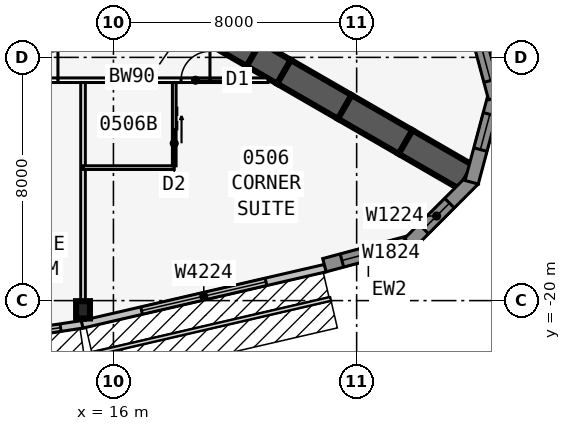
"""IFC4 building model, lengths in metres.
Left out: names, types, materials, properties, quantities, classifications, styles, units other than length and angle.
Written with IfcOpenShell. Run it as: python <this file> out.ifc"""

import sys

from ifc_helpers import new_model, si_unit, direction, frame, frame_2d, origin, origin_2d, place, context, subcontext, project, spatial, polyline, rectangle, i_section, outline, extrude, element, fill, save


model = new_model("IFC4")
c1 = context("Model", 3, precision=1e-05, world=origin(), true_north=direction((0.0, 1.0)))
c2 = subcontext(c1, "Body", "Model", "MODEL_VIEW")
j1 = project(units=[si_unit("LENGTHUNIT", "METRE"), si_unit("PLANEANGLEUNIT", "RADIAN")], contexts=[c1])
p1 = place(None, origin())
s1 = spatial("IfcSite", under=j1, at=p1, CompositionType="ELEMENT")
p2 = place(p1, origin())
s2 = spatial("IfcBuilding", under=s1, at=p2, CompositionType="ELEMENT")
p3 = place(p2, frame((0.0, 0.0, 28.5)))
s3 = spatial("IfcBuildingStorey", under=s2, at=p3, CompositionType="ELEMENT", Elevation=28.5)
p4 = place(p3, frame((16.5, -9.526, 0.0), z_axis=(0.0, 0.0, 1.0), x_axis=(0.866031398331, -0.499989616998, 0.0)))
e1 = element("IfcWall", 1, at=p4, inside=s3, PredefinedType="SHEAR", context=c2, shape_type="SweptSolid", body=[
    extrude(rectangle(XDim=4.746, YDim=0.9, at=frame_2d((2.373, 0.0))), origin(), (0.0, 0.0, 1.0), 3.4),
])
p5 = place(p4, frame((1.8, 0.0, 0.0)))
e2 = element("IfcOpeningElement", 2, at=p5, cuts=e1, PredefinedType="OPENING", context=c2, shape_type="SweptSolid", body=[
    extrude(rectangle(XDim=1.8, YDim=2.13, at=frame_2d((0.9, 1.065))), frame((0.0, 0.46, 0.0), z_axis=(0.0, -1.0, 0.0), x_axis=(1.0, 0.0, 0.0)), (0.0, 0.0, 1.0), 0.92),
])
p6 = place(p3, frame((20.61, -11.899, 0.0), z_axis=(0.0, 0.0, 1.0), x_axis=(0.866009537788, -0.500027479704, 0.0)))
e3 = element("IfcWall", 3, at=p6, inside=s3, PredefinedType="SHEAR", context=c2, shape_type="SweptSolid", body=[
    extrude(rectangle(XDim=1.155, YDim=0.9, at=frame_2d((0.577, 0.0))), origin(), (0.0, 0.0, 1.0), 3.4),
])
for number, where, z_axis, x_axis in (
    (4, (21.61, -12.477, 0.0), (0.0, 0.0, 1.0), (0.866, -0.5, 0.0)),
    (5, (23.61, -13.631, 0.0), (0.0, 0.0, 1.0), (0.866, -0.5, 0.0)),
    (6, (25.61, -14.786, 0.0), (0.0, 0.0, 1.0), (0.866, -0.5, 0.0)),
):
    element("IfcWall", number, at=place(p3, frame(where, z_axis=z_axis, x_axis=x_axis)), inside=s3, PredefinedType="SHEAR", context=c2, shape_type="SweptSolid", body=[
        extrude(rectangle(XDim=2.309, YDim=0.9, at=frame_2d((1.155, 0.0))), origin(), (0.0, 0.0, 1.0), 3.4),
    ])
p7 = place(p3, frame((15.0, -20.303, 0.0), z_axis=(0.0, 0.0, 1.0), x_axis=(1.0, 0.0, 0.0)))
e7 = element("IfcColumn", 7, at=p7, inside=s3, PredefinedType="COLUMN", context=c2, shape_type="SweptSolid", body=[
    extrude(i_section(OverallWidth=0.455, OverallDepth=0.569, WebThickness=0.078, FlangeThickness=0.125, at=origin_2d()), origin(), (0.0, 0.0, 1.0), 3.4),
])
p8 = place(p3, frame((9.981, -21.54, 0.0), z_axis=(0.0, 0.0, 1.0), x_axis=(0.988615403399, 0.150464561152, 0.0)))
e8 = element("IfcWall", 8, at=p8, inside=s3, PredefinedType="STANDARD", context=c2, shape_type="SweptSolid", body=[
    extrude(rectangle(XDim=5.058, YDim=0.25, at=frame_2d((2.529, 0.0))), origin(), (0.0, 0.0, 1.0), 3.235),
])
p9 = place(p8, frame((0.729, 0.0, 0.45)))
e9 = element("IfcOpeningElement", 9, at=p9, cuts=e8, PredefinedType="OPENING", context=c2, shape_type="SweptSolid", body=[
    extrude(rectangle(XDim=3.6, YDim=2.4, at=frame_2d((1.8, 1.2))), frame((0.0, 0.135, 0.0), z_axis=(0.0, -1.0, 0.0), x_axis=(1.0, 0.0, 0.0)), (0.0, 0.0, 1.0), 0.27),
])
p10 = place(p3, frame((14.972, -20.781, 0.0), z_axis=(0.0, 0.0, 1.0), x_axis=(0.974279327392, 0.225343720163, 0.0)))
e10 = element("IfcWall", 10, at=p10, inside=s3, PredefinedType="STANDARD", context=c2, shape_type="SweptSolid", body=[
    extrude(rectangle(XDim=8.211, YDim=0.25, at=frame_2d((4.105, 0.0))), origin(), (0.0, 0.0, 1.0), 3.235),
])
p11 = place(p10, frame((2.006, 0.0, 0.45)))
e11 = element("IfcOpeningElement", 11, at=p11, cuts=e10, PredefinedType="OPENING", context=c2, shape_type="SweptSolid", body=[
    extrude(rectangle(XDim=4.2, YDim=2.4, at=frame_2d((2.1, 1.2))), frame((0.0, 0.135, 0.0), z_axis=(0.0, -1.0, 0.0), x_axis=(1.0, 0.0, 0.0)), (0.0, 0.0, 1.0), 0.27),
])
p12 = place(p3, frame((22.942, -18.835, 0.0), z_axis=(0.0, 0.0, 1.0), x_axis=(0.965930548995, 0.258801419081, 0.0)))
e12 = element("IfcWall", 12, at=p12, inside=s3, PredefinedType="SOLIDWALL", context=c2, shape_type="SweptSolid", body=[
    extrude(rectangle(XDim=2.989, YDim=0.45, at=frame_2d((1.494, 0.0))), origin(), (0.0, 0.0, 1.0), 3.235),
])
p13 = place(p12, frame((0.594, 0.0, 0.45)))
e13 = element("IfcOpeningElement", 13, at=p13, cuts=e12, PredefinedType="OPENING", context=c2, shape_type="SweptSolid", body=[
    extrude(rectangle(XDim=1.8, YDim=2.4, at=frame_2d((0.9, 1.2))), frame((0.0, 0.235, 0.0), z_axis=(0.0, -1.0, 0.0), x_axis=(1.0, 0.0, 0.0)), (0.0, 0.0, 1.0), 0.47),
])
p14 = place(p3, frame((25.728, -18.12, 0.0), z_axis=(0.0, 0.0, 1.0), x_axis=(0.707025086683, 0.707188466253, 0.0)))
e14 = element("IfcWall", 14, at=p14, inside=s3, PredefinedType="SOLIDWALL", context=c2, shape_type="SweptSolid", body=[
    extrude(outline(polyline([(2.989, 0.225), (2.93, 0.225), (2.438, 0.093), (2.402, 0.225), (0.0, 0.225), (0.0, -0.225), (2.989, -0.225), (2.989, 0.225)])), origin(), (0.0, 0.0, 1.0), 3.235),
])
p15 = place(p14, frame((0.676, 0.0, 0.45)))
e15 = element("IfcOpeningElement", 15, at=p15, cuts=e14, PredefinedType="OPENING", context=c2, shape_type="SweptSolid", body=[
    extrude(rectangle(XDim=1.2, YDim=2.4, at=frame_2d((0.6, 1.2))), frame((0.0, 0.235, 0.0), z_axis=(0.0, -1.0, 0.0), x_axis=(1.0, 0.0, 0.0)), (0.0, 0.0, 1.0), 0.47),
])
p16 = place(p3, frame((27.783, -16.108, 0.0), z_axis=(0.0, 0.0, 1.0), x_axis=(0.258801419081, 0.965930548995, 0.0)))
e16 = element("IfcWall", 16, at=p16, inside=s3, PredefinedType="SOLIDWALL", context=c2, shape_type="SweptSolid", body=[
    extrude(outline(polyline([(2.989, 0.225), (0.586, 0.225), (0.551, 0.093), (0.06, 0.225), (0.0, 0.225), (0.0, -0.225), (2.989, -0.225), (2.989, 0.225)])), origin(), (0.0, 0.0, 1.0), 3.235),
])
p17 = place(p16, frame((1.113, 0.0, 0.45)))
e17 = element("IfcOpeningElement", 17, at=p17, cuts=e16, PredefinedType="OPENING", context=c2, shape_type="SweptSolid", body=[
    extrude(rectangle(XDim=1.2, YDim=2.4, at=frame_2d((0.6, 1.2))), frame((0.0, 0.235, 0.0), z_axis=(0.0, -1.0, 0.0), x_axis=(1.0, 0.0, 0.0)), (0.0, 0.0, 1.0), 0.47),
])
p18 = place(p3, frame((28.556, -13.337, 0.0), z_axis=(0.0, 0.0, 1.0), x_axis=(-0.258780998834, 0.965936019953, 0.0)))
e18 = element("IfcWall", 18, at=p18, inside=s3, PredefinedType="SOLIDWALL", context=c2, shape_type="SweptSolid", body=[
    extrude(rectangle(XDim=2.989, YDim=0.45, at=frame_2d((1.494, 0.0))), origin(), (0.0, 0.0, 1.0), 3.235),
])
p19 = place(p18, frame((0.594, 0.0, 0.45)))
e19 = element("IfcOpeningElement", 19, at=p19, cuts=e18, PredefinedType="OPENING", context=c2, shape_type="SweptSolid", body=[
    extrude(rectangle(XDim=1.8, YDim=2.4, at=frame_2d((0.9, 1.2))), frame((0.0, 0.235, 0.0), z_axis=(0.0, -1.0, 0.0), x_axis=(1.0, 0.0, 0.0)), (0.0, 0.0, 1.0), 0.47),
])
p20 = place(p3, frame((-21.086, -12.751, 0.0), z_axis=(0.0, 0.0, 1.0), x_axis=(1.0, 0.0, 0.0)))
e20 = element("IfcWall", 20, at=p20, inside=s3, PredefinedType="PARTITIONING", context=c2, shape_type="SweptSolid", body=[
    extrude(rectangle(XDim=42.172, YDim=0.15, at=frame_2d((21.086, 0.0))), origin(), (0.0, 0.0, 1.0), 3.235),
])
p21 = place(p20, frame((2.338, 0.0, 0.0)))
e21 = element("IfcOpeningElement", 21, at=p21, cuts=e20, PredefinedType="OPENING", context=c2, shape_type="SweptSolid", body=[
    extrude(rectangle(XDim=0.95, YDim=2.13, at=frame_2d((0.475, 1.065))), frame((0.0, 0.085, 0.0), z_axis=(0.0, -1.0, 0.0), x_axis=(1.0, 0.0, 0.0)), (0.0, 0.0, 1.0), 0.17),
])
p22 = place(p20, frame((12.511, 0.0, 0.0)))
e22 = element("IfcOpeningElement", 22, at=p22, cuts=e20, PredefinedType="OPENING", context=c2, shape_type="SweptSolid", body=[
    extrude(rectangle(XDim=0.95, YDim=2.13, at=frame_2d((0.475, 1.065))), frame((0.0, 0.085, 0.0), z_axis=(0.0, -1.0, 0.0), x_axis=(1.0, 0.0, 0.0)), (0.0, 0.0, 1.0), 0.17),
])
p23 = place(p20, frame((18.711, 0.0, 0.0)))
e23 = element("IfcOpeningElement", 23, at=p23, cuts=e20, PredefinedType="OPENING", context=c2, shape_type="SweptSolid", body=[
    extrude(rectangle(XDim=0.95, YDim=2.13, at=frame_2d((0.475, 1.065))), frame((0.0, 0.085, 0.0), z_axis=(0.0, -1.0, 0.0), x_axis=(1.0, 0.0, 0.0)), (0.0, 0.0, 1.0), 0.17),
])
p24 = place(p20, frame((23.086, 0.0, 0.0)))
e24 = element("IfcOpeningElement", 24, at=p24, cuts=e20, PredefinedType="OPENING", context=c2, shape_type="SweptSolid", body=[
    extrude(rectangle(XDim=1.0, YDim=2.13, at=frame_2d((0.5, 1.065))), frame((0.0, 0.085, 0.0), z_axis=(0.0, -1.0, 0.0), x_axis=(1.0, 0.0, 0.0)), (0.0, 0.0, 1.0), 0.17),
])
p25 = place(p20, frame((27.511, 0.0, 0.0)))
e25 = element("IfcOpeningElement", 25, at=p25, cuts=e20, PredefinedType="OPENING", context=c2, shape_type="SweptSolid", body=[
    extrude(rectangle(XDim=0.95, YDim=2.13, at=frame_2d((0.475, 1.065))), frame((0.0, 0.085, 0.0), z_axis=(0.0, -1.0, 0.0), x_axis=(1.0, 0.0, 0.0)), (0.0, 0.0, 1.0), 0.17),
])
p26 = place(p20, frame((34.311, 0.0, 0.0)))
e26 = element("IfcOpeningElement", 26, at=p26, cuts=e20, PredefinedType="OPENING", context=c2, shape_type="SweptSolid", body=[
    extrude(rectangle(XDim=0.95, YDim=2.13, at=frame_2d((0.475, 1.065))), frame((0.0, 0.085, 0.0), z_axis=(0.0, -1.0, 0.0), x_axis=(1.0, 0.0, 0.0)), (0.0, 0.0, 1.0), 0.17),
])
p27 = place(p20, frame((39.311, 0.0, 0.0)))
e27 = element("IfcOpeningElement", 27, at=p27, cuts=e20, PredefinedType="OPENING", context=c2, shape_type="SweptSolid", body=[
    extrude(rectangle(XDim=0.95, YDim=2.13, at=frame_2d((0.475, 1.065))), frame((0.0, 0.085, 0.0), z_axis=(0.0, -1.0, 0.0), x_axis=(1.0, 0.0, 0.0)), (0.0, 0.0, 1.0), 0.17),
])
p28 = place(p3, frame((15.0, -12.826, 0.0), z_axis=(0.0, 0.0, 1.0), x_axis=(0.0, -1.0, 0.0)))
e28 = element("IfcWall", 28, at=p28, inside=s3, PredefinedType="PARTITIONING", context=c2, shape_type="SweptSolid", body=[
    extrude(rectangle(XDim=7.82, YDim=0.15, at=frame_2d((3.91, 0.0))), origin(), (0.0, 0.0, 1.0), 2.389),
])
p29 = place(p3, frame((15.0, -15.626, 0.0), z_axis=(0.0, 0.0, 1.0), x_axis=(1.0, 0.0, 0.0)))
e29 = element("IfcWall", 29, at=p29, inside=s3, PredefinedType="PLUMBINGWALL", context=c2, shape_type="SweptSolid", body=[
    extrude(rectangle(XDim=3.0, YDim=0.12, at=frame_2d((1.5, 0.0))), origin(), (0.0, 0.0, 1.0), 3.235),
])
p30 = place(p3, frame((18.0, -12.826, 0.0), z_axis=(0.0, 0.0, 1.0), x_axis=(0.0, -1.0, 0.0)))
e30 = element("IfcWall", 30, at=p30, inside=s3, PredefinedType="PLUMBINGWALL", context=c2, shape_type="SweptSolid", body=[
    extrude(rectangle(XDim=2.74, YDim=0.12, at=frame_2d((1.37, 0.0))), origin(), (0.0, 0.0, 1.0), 3.235),
])
p31 = place(p30, frame((1.55, 0.0, 0.0)))
e31 = element("IfcOpeningElement", 31, at=p31, cuts=e30, PredefinedType="OPENING", context=c2, shape_type="SweptSolid", body=[
    extrude(rectangle(XDim=0.9, YDim=2.13, at=frame_2d((0.45, 1.065))), frame((0.0, 0.07, 0.0), z_axis=(0.0, -1.0, 0.0), x_axis=(1.0, 0.0, 0.0)), (0.0, 0.0, 1.0), 0.14),
])
p32 = place(p9, origin())
e32 = element("IfcWindow", 32, at=p32, inside=s3, PartitioningType="SINGLE_PANEL", PredefinedType="WINDOW", context=c2, shape_type="SweptSolid", body=[
    extrude(rectangle(XDim=3.6, YDim=2.4, at=frame_2d((1.8, 1.2))), frame((0.0, 0.03, 0.0), z_axis=(0.0, -1.0, 0.0), x_axis=(1.0, 0.0, 0.0)), (0.0, 0.0, 1.0), 0.06),
])
fill(e9, e32)
p33 = place(p11, origin())
e33 = element("IfcWindow", 33, at=p33, inside=s3, PartitioningType="SINGLE_PANEL", PredefinedType="WINDOW", context=c2, shape_type="SweptSolid", body=[
    extrude(rectangle(XDim=4.2, YDim=2.4, at=frame_2d((2.1, 1.2))), frame((0.0, 0.03, 0.0), z_axis=(0.0, -1.0, 0.0), x_axis=(1.0, 0.0, 0.0)), (0.0, 0.0, 1.0), 0.06),
])
fill(e11, e33)
p34 = place(p13, origin())
e34 = element("IfcWindow", 34, at=p34, inside=s3, PartitioningType="SINGLE_PANEL", PredefinedType="WINDOW", context=c2, shape_type="SweptSolid", body=[
    extrude(rectangle(XDim=1.8, YDim=2.4, at=frame_2d((0.9, 1.2))), frame((0.0, 0.03, 0.0), z_axis=(0.0, -1.0, 0.0), x_axis=(1.0, 0.0, 0.0)), (0.0, 0.0, 1.0), 0.06),
])
fill(e13, e34)
p35 = place(p15, origin())
e35 = element("IfcWindow", 35, at=p35, inside=s3, PartitioningType="SINGLE_PANEL", PredefinedType="WINDOW", context=c2, shape_type="SweptSolid", body=[
    extrude(rectangle(XDim=1.2, YDim=2.4, at=frame_2d((0.6, 1.2))), frame((0.0, 0.03, 0.0), z_axis=(0.0, -1.0, 0.0), x_axis=(1.0, 0.0, 0.0)), (0.0, 0.0, 1.0), 0.06),
])
fill(e15, e35)
p36 = place(p17, origin())
e36 = element("IfcWindow", 36, at=p36, inside=s3, PartitioningType="SINGLE_PANEL", PredefinedType="WINDOW", context=c2, shape_type="SweptSolid", body=[
    extrude(rectangle(XDim=1.2, YDim=2.4, at=frame_2d((0.6, 1.2))), frame((0.0, 0.03, 0.0), z_axis=(0.0, -1.0, 0.0), x_axis=(1.0, 0.0, 0.0)), (0.0, 0.0, 1.0), 0.06),
])
fill(e17, e36)
p37 = place(p19, origin())
e37 = element("IfcWindow", 37, at=p37, inside=s3, PartitioningType="SINGLE_PANEL", PredefinedType="WINDOW", context=c2, shape_type="SweptSolid", body=[
    extrude(rectangle(XDim=1.8, YDim=2.4, at=frame_2d((0.9, 1.2))), frame((0.0, 0.03, 0.0), z_axis=(0.0, -1.0, 0.0), x_axis=(1.0, 0.0, 0.0)), (0.0, 0.0, 1.0), 0.06),
])
fill(e19, e37)
p38 = place(p26, origin())
e38 = element("IfcDoor", 38, at=p38, inside=s3, OperationType="SINGLE_SWING_RIGHT", PredefinedType="DOOR", context=c2, shape_type="SweptSolid", body=[
    extrude(rectangle(XDim=0.95, YDim=2.13, at=frame_2d((0.475, 1.065))), frame((0.0, 0.025, 0.0), z_axis=(0.0, -1.0, 0.0), x_axis=(1.0, 0.0, 0.0)), (0.0, 0.0, 1.0), 0.05),
])
fill(e26, e38)
p39 = place(p31, origin())
e39 = element("IfcDoor", 39, at=p39, inside=s3, OperationType="SLIDING_TO_LEFT", PredefinedType="DOOR", context=c2, shape_type="SweptSolid", body=[
    extrude(rectangle(XDim=0.9, YDim=2.13, at=frame_2d((0.45, 1.065))), frame((0.0, 0.025, 0.0), z_axis=(0.0, -1.0, 0.0), x_axis=(1.0, 0.0, 0.0)), (0.0, 0.0, 1.0), 0.05),
])
fill(e31, e39)
p40 = place(p27, origin())
e40 = element("IfcDoor", 40, at=p40, inside=s3, OperationType="SINGLE_SWING_RIGHT", PredefinedType="DOOR", context=c2, shape_type="SweptSolid", body=[
    extrude(rectangle(XDim=0.95, YDim=2.13, at=frame_2d((0.475, 1.065))), frame((0.0, 0.025, 0.0), z_axis=(0.0, -1.0, 0.0), x_axis=(1.0, 0.0, 0.0)), (0.0, 0.0, 1.0), 0.05),
])
fill(e27, e40)
save(model, sys.argv[1])
